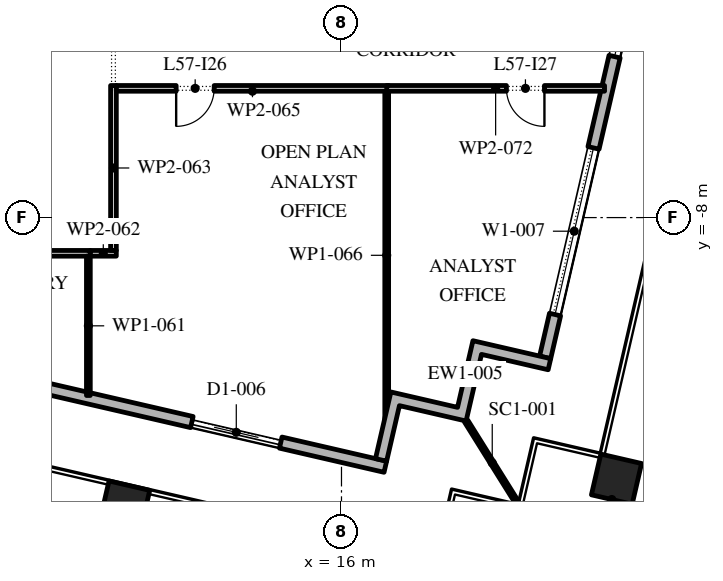
"""IFC4 building model, lengths in metres.
Left out: names, types, materials, properties, quantities, classifications, styles, units other than length and angle.
Written with IfcOpenShell. Run it as: python <this file> out.ifc"""

import sys

from ifc_helpers import new_model, si_unit, direction, frame, frame_2d, origin, origin_2d, place, context, subcontext, project, spatial, polyline, rectangle, outline, extrude, element, fill, save


model = new_model("IFC4")
c1 = context("Model", 3, precision=1e-05, world=origin(), true_north=direction((0.0, 1.0)))
c2 = subcontext(c1, "Body", "Model", "MODEL_VIEW")
j1 = project(units=[si_unit("LENGTHUNIT", "METRE"), si_unit("PLANEANGLEUNIT", "RADIAN")], contexts=[c1])
p1 = place(None, origin())
s1 = spatial("IfcSite", under=j1, at=p1, CompositionType="ELEMENT")
p2 = place(p1, origin())
s2 = spatial("IfcBuilding", under=s1, at=p2, CompositionType="ELEMENT")
p3 = place(p2, frame((0.0, 0.0, 264.0)))
s3 = spatial("IfcBuildingStorey", under=s2, at=p3, CompositionType="ELEMENT", Elevation=264.0)
for number, where, z_axis, x_axis in (
    (1, (10.295, -15.59, 0.0), (0.0, 0.0, 1.0), (0.974, -0.225, 0.0)),
    (2, (23.236, -14.883, 0.0), (0.0, 0.0, 1.0), (0.974, -0.225, 0.0)),
):
    element("IfcColumn", number, at=place(p3, frame(where, z_axis=z_axis, x_axis=x_axis)), inside=s3, PredefinedType="COLUMN", context=c2, shape_type="SweptSolid", body=[
        extrude(rectangle(XDim=1.1, YDim=1.1, at=origin_2d()), origin(), (0.0, 0.0, 1.0), 4.2),
    ])
p4 = place(p3, frame((-29.616, -3.758, 0.0), z_axis=(0.0, 0.0, 1.0), x_axis=(0.974370532314, -0.224949029246, 0.0)))
e3 = element("IfcWall", 3, at=p4, inside=s3, PredefinedType="STANDARD", context=c2, shape_type="SweptSolid", body=[
    extrude(rectangle(XDim=48.0, YDim=0.3, at=frame_2d((24.0, 0.0))), origin(), (0.0, 0.0, 1.0), 4.0),
])
p5 = place(p4, frame((1.625, 0.0, 0.45)))
e4 = element("IfcOpeningElement", 4, at=p5, cuts=e3, PredefinedType="OPENING", context=c2, shape_type="SweptSolid", body=[
    extrude(rectangle(XDim=4.5, YDim=3.05, at=frame_2d((2.25, 1.525))), frame((0.0, 0.16, 0.0), z_axis=(0.0, -1.0, 0.0), x_axis=(1.0, 0.0, 0.0)), (0.0, 0.0, 1.0), 0.32),
])
p6 = place(p4, frame((10.575, 0.0, 0.0)))
e5 = element("IfcOpeningElement", 5, at=p6, cuts=e3, PredefinedType="OPENING", context=c2, shape_type="SweptSolid", body=[
    extrude(rectangle(XDim=2.4, YDim=3.5, at=frame_2d((1.2, 1.75))), frame((0.0, 0.16, 0.0), z_axis=(0.0, -1.0, 0.0), x_axis=(1.0, 0.0, 0.0)), (0.0, 0.0, 1.0), 0.32),
])
p7 = place(p4, frame((17.575, 0.0, 0.45)))
e6 = element("IfcOpeningElement", 6, at=p7, cuts=e3, PredefinedType="OPENING", context=c2, shape_type="SweptSolid", body=[
    extrude(rectangle(XDim=4.5, YDim=3.0, at=frame_2d((2.25, 1.5))), frame((0.0, 0.16, 0.0), z_axis=(0.0, -1.0, 0.0), x_axis=(1.0, 0.0, 0.0)), (0.0, 0.0, 1.0), 0.32),
])
p8 = place(p4, frame((25.625, 0.0, 0.45)))
e7 = element("IfcOpeningElement", 7, at=p8, cuts=e3, PredefinedType="OPENING", context=c2, shape_type="SweptSolid", body=[
    extrude(rectangle(XDim=4.5, YDim=2.95, at=frame_2d((2.25, 1.475))), frame((0.0, 0.16, 0.0), z_axis=(0.0, -1.0, 0.0), x_axis=(1.0, 0.0, 0.0)), (0.0, 0.0, 1.0), 0.32),
])
p9 = place(p4, frame((33.675, 0.0, 0.45)))
e8 = element("IfcOpeningElement", 8, at=p9, cuts=e3, PredefinedType="OPENING", context=c2, shape_type="SweptSolid", body=[
    extrude(rectangle(XDim=4.5, YDim=2.825, at=frame_2d((2.25, 1.413))), frame((0.0, 0.16, 0.0), z_axis=(0.0, -1.0, 0.0), x_axis=(1.0, 0.0, 0.0)), (0.0, 0.0, 1.0), 0.32),
])
p10 = place(p4, frame((42.775, 0.0, 0.0)))
e9 = element("IfcOpeningElement", 9, at=p10, cuts=e3, PredefinedType="OPENING", context=c2, shape_type="SweptSolid", body=[
    extrude(rectangle(XDim=2.4, YDim=3.5, at=frame_2d((1.2, 1.75))), frame((0.0, 0.16, 0.0), z_axis=(0.0, -1.0, 0.0), x_axis=(1.0, 0.0, 0.0)), (0.0, 0.0, 1.0), 0.32),
])
p11 = place(p3, frame((21.359, -11.678, 0.0), z_axis=(0.0, 0.0, 1.0), x_axis=(0.224949198343, 0.974370493275, 0.0)))
e10 = element("IfcWall", 10, at=p11, inside=s3, PredefinedType="STANDARD", context=c2, shape_type="SweptSolid", body=[
    extrude(rectangle(XDim=49.5, YDim=0.3, at=frame_2d((24.75, 0.0))), origin(), (0.0, 0.0, 1.0), 4.0),
])
p12 = place(p11, frame((1.157, 0.0, 0.45)))
e11 = element("IfcOpeningElement", 11, at=p12, cuts=e10, PredefinedType="OPENING", context=c2, shape_type="SweptSolid", body=[
    extrude(rectangle(XDim=4.5, YDim=3.05, at=frame_2d((2.25, 1.525))), frame((0.0, 0.16, 0.0), z_axis=(0.0, -1.0, 0.0), x_axis=(1.0, 0.0, 0.0)), (0.0, 0.0, 1.0), 0.32),
])
p13 = place(p11, frame((8.121, 0.0, 0.45)))
e12 = element("IfcOpeningElement", 12, at=p13, cuts=e10, PredefinedType="OPENING", context=c2, shape_type="SweptSolid", body=[
    extrude(rectangle(XDim=4.5, YDim=3.05, at=frame_2d((2.25, 1.525))), frame((0.0, 0.16, 0.0), z_axis=(0.0, -1.0, 0.0), x_axis=(1.0, 0.0, 0.0)), (0.0, 0.0, 1.0), 0.32),
])
p14 = place(p11, frame((15.236, 0.0, 0.45)))
e13 = element("IfcOpeningElement", 13, at=p14, cuts=e10, PredefinedType="OPENING", context=c2, shape_type="SweptSolid", body=[
    extrude(rectangle(XDim=4.5, YDim=3.05, at=frame_2d((2.25, 1.525))), frame((0.0, 0.16, 0.0), z_axis=(0.0, -1.0, 0.0), x_axis=(1.0, 0.0, 0.0)), (0.0, 0.0, 1.0), 0.32),
])
p15 = place(p11, frame((22.35, 0.0, 0.45)))
e14 = element("IfcOpeningElement", 14, at=p15, cuts=e10, PredefinedType="OPENING", context=c2, shape_type="SweptSolid", body=[
    extrude(rectangle(XDim=4.5, YDim=3.05, at=frame_2d((2.25, 1.525))), frame((0.0, 0.16, 0.0), z_axis=(0.0, -1.0, 0.0), x_axis=(1.0, 0.0, 0.0)), (0.0, 0.0, 1.0), 0.32),
])
p16 = place(p11, frame((29.464, 0.0, 0.45)))
e15 = element("IfcOpeningElement", 15, at=p16, cuts=e10, PredefinedType="OPENING", context=c2, shape_type="SweptSolid", body=[
    extrude(rectangle(XDim=4.5, YDim=2.95, at=frame_2d((2.25, 1.475))), frame((0.0, 0.16, 0.0), z_axis=(0.0, -1.0, 0.0), x_axis=(1.0, 0.0, 0.0)), (0.0, 0.0, 1.0), 0.32),
])
p17 = place(p11, frame((37.628, 0.0, 0.0)))
e16 = element("IfcOpeningElement", 16, at=p17, cuts=e10, PredefinedType="OPENING", context=c2, shape_type="SweptSolid", body=[
    extrude(rectangle(XDim=2.4, YDim=3.325, at=frame_2d((1.2, 1.663))), frame((0.0, 0.16, 0.0), z_axis=(0.0, -1.0, 0.0), x_axis=(1.0, 0.0, 0.0)), (0.0, 0.0, 1.0), 0.32),
])
p18 = place(p11, frame((43.693, 0.0, 0.45)))
e17 = element("IfcOpeningElement", 17, at=p18, cuts=e10, PredefinedType="OPENING", context=c2, shape_type="SweptSolid", body=[
    extrude(rectangle(XDim=4.5, YDim=3.05, at=frame_2d((2.25, 1.525))), frame((0.0, 0.16, 0.0), z_axis=(0.0, -1.0, 0.0), x_axis=(1.0, 0.0, 0.0)), (0.0, 0.0, 1.0), 0.32),
])
p19 = place(p3, origin())
e18 = element("IfcWall", 18, at=p19, inside=s3, PredefinedType="STANDARD", context=c2, shape_type="SweptSolid", body=[
    extrude(outline(polyline([(19.054, -12.993), (19.459, -11.24), (21.505, -11.712), (21.438, -12.004), (19.684, -11.599), (19.279, -13.353), (17.525, -12.948), (17.188, -14.41), (16.895, -14.342), (17.3, -12.588), (19.054, -12.993)])), origin(), (0.0, 0.0, 1.0), 4.0),
])
p20 = place(p3, frame((19.279, -13.353, -0.05), z_axis=(0.0, 0.0, 1.0), x_axis=(0.529914407191, -0.848051131154, 0.0)))
e19 = element("IfcWall", 19, at=p20, inside=s3, PredefinedType="STANDARD", context=c2, shape_type="SweptSolid", body=[
    extrude(rectangle(XDim=2.596, YDim=0.1, at=frame_2d((1.298, 0.0))), origin(), (0.0, 0.0, 1.0), 4.05),
])
p21 = place(p3, frame((9.39, -8.94, 0.0), z_axis=(0.0, 0.0, 1.0), x_axis=(-1.0, 0.0, 0.0)))
e20 = element("IfcWall", 20, at=p21, inside=s3, PredefinedType="PARTITIONING", context=c2, shape_type="SweptSolid", body=[
    extrude(rectangle(XDim=8.215, YDim=0.15, at=frame_2d((4.107, 0.0))), origin(), (0.0, 0.0, 1.0), 4.0),
])
p22 = place(p21, frame((5.39, 0.0, 0.0)))
e21 = element("IfcOpeningElement", 21, at=p22, cuts=e20, PredefinedType="OPENING", context=c2, shape_type="SweptSolid", body=[
    extrude(rectangle(XDim=1.0, YDim=2.1, at=frame_2d((0.5, 1.05))), frame((0.0, 0.085, 0.0), z_axis=(0.0, -1.0, 0.0), x_axis=(1.0, 0.0, 0.0)), (0.0, 0.0, 1.0), 0.17),
])
p23 = place(p3, frame((9.34, -9.015, 0.0), z_axis=(0.0, 0.0, 1.0), x_axis=(0.0, -1.0, 0.0)))
e22 = element("IfcWall", 22, at=p23, inside=s3, PredefinedType="PARTITIONING", context=c2, shape_type="SweptSolid", body=[
    extrude(rectangle(XDim=3.666, YDim=0.1, at=frame_2d((1.833, 0.0))), origin(), (0.0, 0.0, 1.0), 4.0),
])
p24 = place(p3, frame((10.075, -8.94, 0.0), z_axis=(0.0, 0.0, 1.0), x_axis=(-1.0, 0.0, 0.0)))
e23 = element("IfcWall", 23, at=p24, inside=s3, PredefinedType="PARTITIONING", context=c2, shape_type="SweptSolid", body=[
    extrude(rectangle(XDim=0.685, YDim=0.15, at=frame_2d((0.343, 0.0))), origin(), (0.0, 0.0, 1.0), 4.0),
])
p25 = place(p3, frame((10.0, -4.525, 0.0), z_axis=(0.0, 0.0, 1.0), x_axis=(0.0, -1.0, 0.0)))
e24 = element("IfcWall", 24, at=p25, inside=s3, PredefinedType="PARTITIONING", context=c2, shape_type="SweptSolid", body=[
    extrude(rectangle(XDim=4.34, YDim=0.15, at=frame_2d((2.17, 0.0))), origin(), (0.0, 0.0, 1.0), 4.0),
])
p26 = place(p3, frame((17.24, -4.6, 0.0), z_axis=(0.0, 0.0, 1.0), x_axis=(-1.0, 0.0, 0.0)))
e25 = element("IfcWall", 25, at=p26, inside=s3, PredefinedType="PARTITIONING", context=c2, shape_type="SweptSolid", body=[
    extrude(rectangle(XDim=7.165, YDim=0.15, at=frame_2d((3.583, 0.0))), origin(), (0.0, 0.0, 1.0), 4.0),
])
p27 = place(p26, frame((4.59, 0.0, 0.0)))
e26 = element("IfcOpeningElement", 26, at=p27, cuts=e25, PredefinedType="OPENING", context=c2, shape_type="SweptSolid", body=[
    extrude(rectangle(XDim=1.0, YDim=2.1, at=frame_2d((0.5, 1.05))), frame((0.0, 0.085, 0.0), z_axis=(0.0, -1.0, 0.0), x_axis=(1.0, 0.0, 0.0)), (0.0, 0.0, 1.0), 0.17),
])
p28 = place(p3, frame((17.19, -4.675, 0.0), z_axis=(0.0, 0.0, 1.0), x_axis=(0.0, -1.0, 0.0)))
e27 = element("IfcWall", 27, at=p28, inside=s3, PredefinedType="PARTITIONING", context=c2, shape_type="SweptSolid", body=[
    extrude(rectangle(XDim=8.635, YDim=0.1, at=frame_2d((4.317, 0.0))), origin(), (0.0, 0.0, 1.0), 4.0),
])
p29 = place(p3, frame((22.922, -4.6, 0.0), z_axis=(0.0, 0.0, 1.0), x_axis=(-1.0, 0.0, 0.0)))
e28 = element("IfcWall", 28, at=p29, inside=s3, PredefinedType="PARTITIONING", context=c2, shape_type="SweptSolid", body=[
    extrude(rectangle(XDim=5.732, YDim=0.15, at=frame_2d((2.866, 0.0))), origin(), (0.0, 0.0, 1.0), 4.0),
])
p30 = place(p29, frame((1.582, 0.0, 0.0)))
e29 = element("IfcOpeningElement", 29, at=p30, cuts=e28, PredefinedType="OPENING", context=c2, shape_type="SweptSolid", body=[
    extrude(rectangle(XDim=1.0, YDim=2.1, at=frame_2d((0.5, 1.05))), frame((0.0, 0.085, 0.0), z_axis=(0.0, -1.0, 0.0), x_axis=(1.0, 0.0, 0.0)), (0.0, 0.0, 1.0), 0.17),
])
p31 = place(p10, origin())
e30 = element("IfcDoor", 30, at=p31, inside=s3, OperationType="DOUBLE_DOOR_SLIDING", PredefinedType="DOOR", context=c2, shape_type="SweptSolid", body=[
    extrude(rectangle(XDim=2.4, YDim=3.5, at=frame_2d((1.2, 1.75))), frame((0.0, 0.025, 0.0), z_axis=(0.0, -1.0, 0.0), x_axis=(1.0, 0.0, 0.0)), (0.0, 0.0, 1.0), 0.05),
])
fill(e9, e30)
p32 = place(p12, origin())
e31 = element("IfcWindow", 31, at=p32, inside=s3, PartitioningType="DOUBLE_PANEL_VERTICAL", PredefinedType="WINDOW", context=c2, shape_type="SweptSolid", body=[
    extrude(rectangle(XDim=4.5, YDim=3.05, at=frame_2d((2.25, 1.525))), frame((0.0, 0.03, 0.0), z_axis=(0.0, -1.0, 0.0), x_axis=(1.0, 0.0, 0.0)), (0.0, 0.0, 1.0), 0.06),
])
fill(e11, e31)
p33 = place(p13, origin())
e32 = element("IfcWindow", 32, at=p33, inside=s3, PartitioningType="DOUBLE_PANEL_VERTICAL", PredefinedType="WINDOW", context=c2, shape_type="SweptSolid", body=[
    extrude(rectangle(XDim=4.5, YDim=3.05, at=frame_2d((2.25, 1.525))), frame((0.0, 0.03, 0.0), z_axis=(0.0, -1.0, 0.0), x_axis=(1.0, 0.0, 0.0)), (0.0, 0.0, 1.0), 0.06),
])
fill(e12, e32)
p34 = place(p27, origin())
e33 = element("IfcDoor", 33, at=p34, inside=s3, OperationType="SINGLE_SWING_LEFT", PredefinedType="DOOR", context=c2, shape_type="SweptSolid", body=[
    extrude(rectangle(XDim=1.0, YDim=2.1, at=frame_2d((0.5, 1.05))), frame((0.0, 0.025, 0.0), z_axis=(0.0, -1.0, 0.0), x_axis=(1.0, 0.0, 0.0)), (0.0, 0.0, 1.0), 0.05),
])
fill(e26, e33)
p35 = place(p30, origin())
e34 = element("IfcDoor", 34, at=p35, inside=s3, OperationType="SINGLE_SWING_RIGHT", PredefinedType="DOOR", context=c2, shape_type="SweptSolid", body=[
    extrude(rectangle(XDim=1.0, YDim=2.1, at=frame_2d((0.5, 1.05))), frame((0.0, 0.025, 0.0), z_axis=(0.0, -1.0, 0.0), x_axis=(1.0, 0.0, 0.0)), (0.0, 0.0, 1.0), 0.05),
])
fill(e29, e34)
save(model, sys.argv[1])
